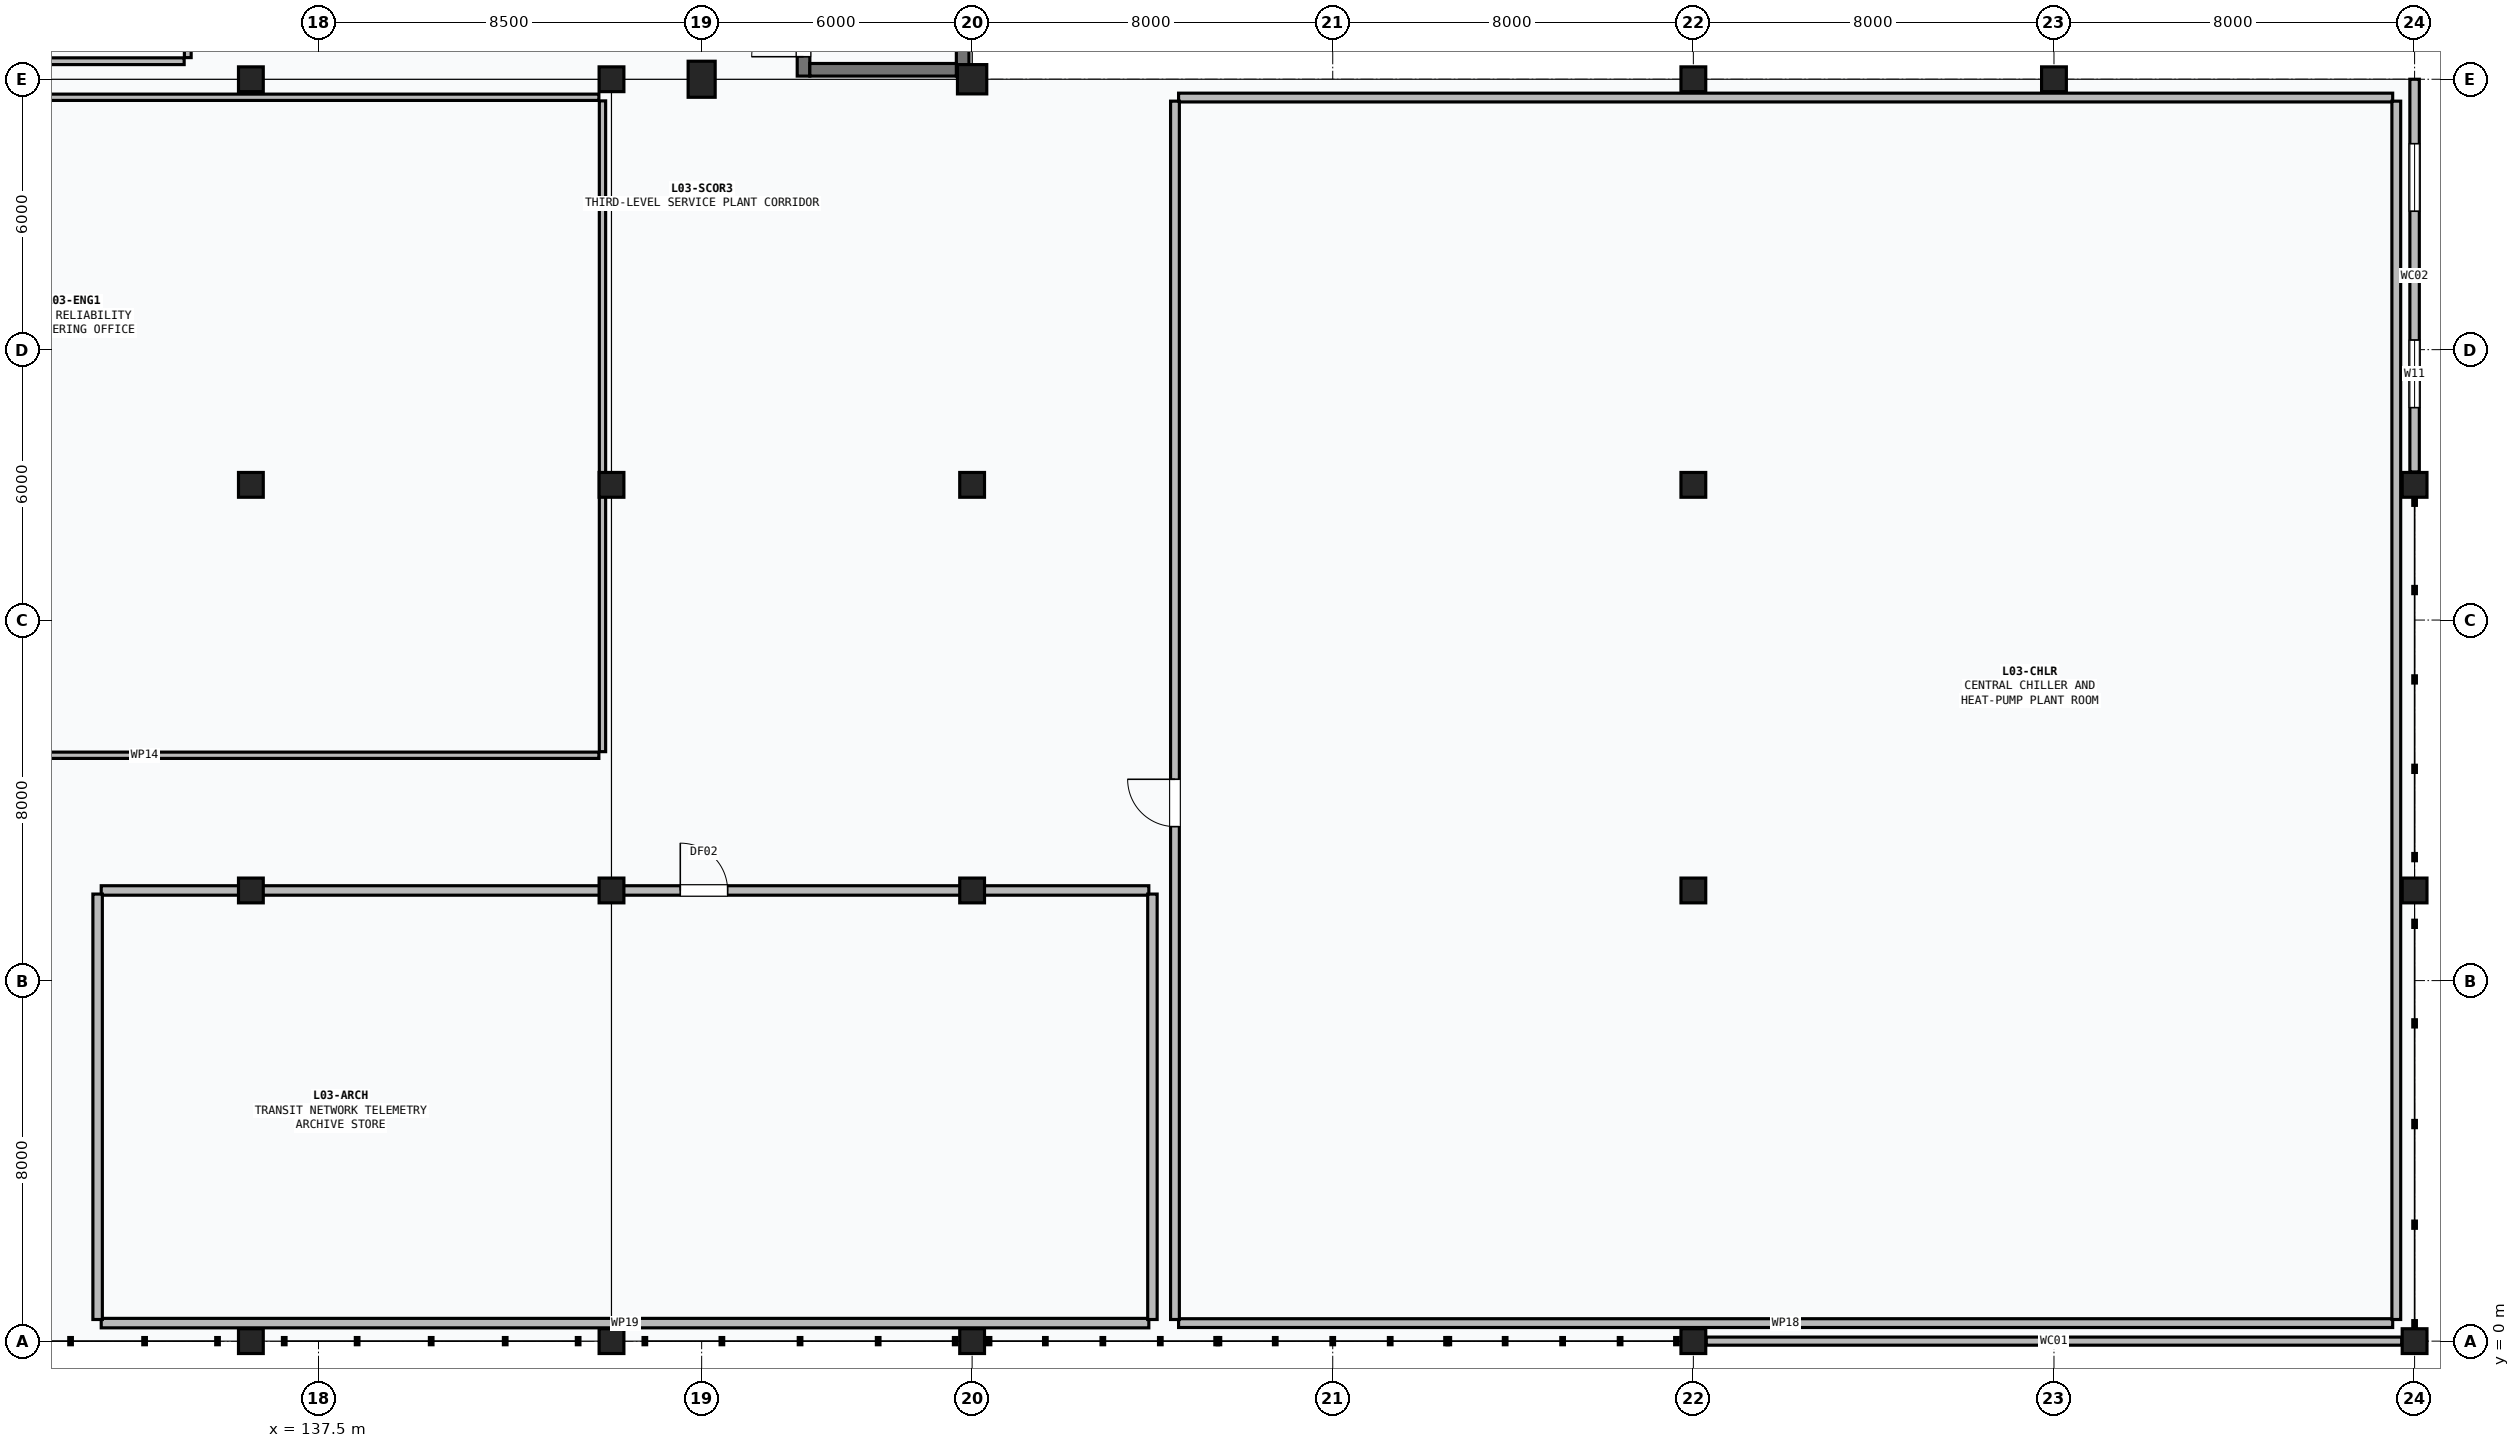
"""IFC4 building model, lengths in metres.
Left out: names, types, materials, properties, quantities, classifications, styles, units other than length and angle.
Written with IfcOpenShell. Run it as: python <this file> out.ifc"""

import sys

from ifc_helpers import new_model, si_unit, direction, frame, frame_2d, origin, origin_2d, place, context, subcontext, project, spatial, rectangle, i_section, extrude, element, fill, save


model = new_model("IFC4")
c1 = context("Model", 3, precision=1e-05, world=origin(), true_north=direction((0.0, 1.0)))
c2 = subcontext(c1, "Body", "Model", "MODEL_VIEW")
j1 = project(units=[si_unit("LENGTHUNIT", "METRE"), si_unit("PLANEANGLEUNIT", "RADIAN")], contexts=[c1])
p1 = place(None, origin())
s1 = spatial("IfcSite", under=j1, at=p1, CompositionType="ELEMENT")
p2 = place(p1, origin())
s2 = spatial("IfcBuilding", under=s1, at=p2, CompositionType="ELEMENT")
p3 = place(p2, frame((0.0, 0.0, 12.0)))
s3 = spatial("IfcBuildingStorey", under=s2, at=p3, CompositionType="ELEMENT", Elevation=12.0)
p4 = place(p3, frame((146.0, 28.0, 0.0), z_axis=(0.0, 0.0, 1.0), x_axis=(1.0, 0.0, 0.0)))
e1 = element("IfcColumn", 1, at=p4, inside=s3, PredefinedType="COLUMN", context=c2, shape_type="SweptSolid", body=[
    extrude(rectangle(XDim=0.6, YDim=0.8, at=origin_2d()), origin(), (0.0, 0.0, 1.0), 3.6),
])
p5 = place(p3, frame((152.0, 28.0, 0.0), z_axis=(0.0, 0.0, 1.0), x_axis=(1.0, 0.0, 0.0)))
e2 = element("IfcColumn", 2, at=p5, inside=s3, PredefinedType="COLUMN", context=c2, shape_type="SweptSolid", body=[
    extrude(rectangle(XDim=0.65, YDim=0.65, at=origin_2d()), origin(), (0.0, 0.0, 1.0), 3.6),
])
for number, where, z_axis, x_axis in (
    (3, (136.0, 0.0, 0.0), (0.0, 0.0, 1.0), (1.0, 0.0, 0.0)),
    (4, (136.0, 10.0, 0.0), (0.0, 0.0, 1.0), (1.0, 0.0, 0.0)),
    (5, (136.0, 19.0, 0.0), (0.0, 0.0, 1.0), (1.0, 0.0, 0.0)),
    (6, (136.0, 28.0, 0.0), (0.0, 0.0, 1.0), (1.0, 0.0, 0.0)),
    (7, (144.0, 0.0, 0.0), (0.0, 0.0, 1.0), (1.0, 0.0, 0.0)),
    (8, (144.0, 10.0, 0.0), (0.0, 0.0, 1.0), (1.0, 0.0, 0.0)),
    (9, (144.0, 19.0, 0.0), (0.0, 0.0, 1.0), (1.0, 0.0, 0.0)),
    (10, (144.0, 28.0, 0.0), (0.0, 0.0, 1.0), (1.0, 0.0, 0.0)),
    (11, (152.0, 0.0, 0.0), (0.0, 0.0, 1.0), (1.0, 0.0, 0.0)),
    (12, (152.0, 10.0, 0.0), (0.0, 0.0, 1.0), (1.0, 0.0, 0.0)),
    (13, (152.0, 19.0, 0.0), (0.0, 0.0, 1.0), (1.0, 0.0, 0.0)),
    (14, (168.0, 0.0, 0.0), (0.0, 0.0, 1.0), (1.0, 0.0, 0.0)),
    (15, (168.0, 10.0, 0.0), (0.0, 0.0, 1.0), (1.0, 0.0, 0.0)),
    (16, (168.0, 19.0, 0.0), (0.0, 0.0, 1.0), (1.0, 0.0, 0.0)),
    (17, (168.0, 28.0, 0.0), (0.0, 0.0, 1.0), (1.0, 0.0, 0.0)),
    (18, (176.0, 28.0, 0.0), (0.0, 0.0, 1.0), (1.0, 0.0, 0.0)),
    (19, (184.0, 0.0, 0.0), (0.0, 0.0, 1.0), (1.0, 0.0, 0.0)),
    (20, (184.0, 10.0, 0.0), (0.0, 0.0, 1.0), (1.0, 0.0, 0.0)),
    (21, (184.0, 19.0, 0.0), (0.0, 0.0, 1.0), (1.0, 0.0, 0.0)),
):
    element("IfcColumn", number, at=place(p3, frame(where, z_axis=z_axis, x_axis=x_axis)), inside=s3, PredefinedType="COLUMN", context=c2, shape_type="SweptSolid", body=[
        extrude(rectangle(XDim=0.55, YDim=0.55, at=origin_2d()), origin(), (0.0, 0.0, 1.0), 3.6),
    ])
p6 = place(p2, frame((0.0, 0.0, 8.4)))
s4 = spatial("IfcBuildingStorey", under=s2, at=p6, CompositionType="ELEMENT", Elevation=8.4)
p7 = place(p6, frame((184.0, 28.0, 0.0), z_axis=(0.0, 0.0, 1.0), x_axis=(1.0, 0.0, 0.0)))
e22 = element("IfcColumn", 22, at=p7, inside=s4, PredefinedType="COLUMN", context=c2, shape_type="SweptSolid", body=[
    extrude(i_section(OverallWidth=0.309, OverallDepth=0.321, WebThickness=0.014, FlangeThickness=0.022, FilletRadius=0.015, at=origin_2d()), origin(), (0.0, 0.0, 1.0), 8.15),
])
p8 = place(p3, frame((168.285, 0.0, 0.0), z_axis=(0.0, 0.0, 1.0), x_axis=(1.0, 0.0, 0.0)))
e23 = element("IfcWall", 23, at=p8, inside=s3, PredefinedType="USERDEFINED", context=c2, shape_type="SweptSolid", body=[
    extrude(rectangle(XDim=15.43, YDim=0.18, at=frame_2d((7.715, 0.0))), origin(), (0.0, 0.0, 1.0), 2.195),
])
p9 = place(p3, frame((184.0, 19.285, 0.0), z_axis=(0.0, 0.0, 1.0), x_axis=(0.0, 1.0, 0.0)))
e24 = element("IfcWall", 24, at=p9, inside=s3, PredefinedType="USERDEFINED", context=c2, shape_type="SweptSolid", body=[
    extrude(rectangle(XDim=8.715, YDim=0.21, at=frame_2d((4.357, 0.0))), origin(), (0.0, 0.0, 1.0), 3.335),
])
p10 = place(p9, frame((1.429, 0.0, 0.95)))
e25 = element("IfcOpeningElement", 25, at=p10, cuts=e24, PredefinedType="OPENING", context=c2, shape_type="SweptSolid", body=[
    extrude(rectangle(XDim=1.5, YDim=1.8, at=frame_2d((0.75, 0.9))), frame((0.0, 0.115, 0.0), z_axis=(0.0, -1.0, 0.0), x_axis=(1.0, 0.0, 0.0)), (0.0, 0.0, 1.0), 0.23),
])
p11 = place(p9, frame((5.786, 0.0, 0.95)))
e26 = element("IfcOpeningElement", 26, at=p11, cuts=e24, PredefinedType="OPENING", context=c2, shape_type="SweptSolid", body=[
    extrude(rectangle(XDim=1.5, YDim=1.8, at=frame_2d((0.75, 0.9))), frame((0.0, 0.115, 0.0), z_axis=(0.0, -1.0, 0.0), x_axis=(1.0, 0.0, 0.0)), (0.0, 0.0, 1.0), 0.23),
])
p12 = place(p3, frame((148.26, 28.07, 0.0), z_axis=(0.0, 0.0, 1.0), x_axis=(0.0, 1.0, 0.0)))
e27 = element("IfcWall", 27, at=p12, inside=s3, PredefinedType="SHEAR", context=c2, shape_type="SweptSolid", body=[
    extrude(rectangle(XDim=9.86, YDim=0.28, at=frame_2d((4.93, 0.0))), origin(), (0.0, 0.0, 1.0), 3.6),
])
p13 = place(p12, frame((0.43, 0.0, 0.0)))
e28 = element("IfcOpeningElement", 28, at=p13, cuts=e27, PredefinedType="OPENING", context=c2, shape_type="SweptSolid", body=[
    extrude(rectangle(XDim=1.15, YDim=2.15, at=frame_2d((0.575, 1.075))), frame((0.0, 0.15, 0.0), z_axis=(0.0, -1.0, 0.0), x_axis=(1.0, 0.0, 0.0)), (0.0, 0.0, 1.0), 0.3),
])
p14 = place(p3, frame((151.79, 37.93, 0.0), z_axis=(0.0, 0.0, 1.0), x_axis=(0.0, -1.0, 0.0)))
e29 = element("IfcWall", 29, at=p14, inside=s3, PredefinedType="SHEAR", context=c2, shape_type="SweptSolid", body=[
    extrude(rectangle(XDim=9.86, YDim=0.28, at=frame_2d((4.93, 0.0))), origin(), (0.0, 0.0, 1.0), 3.6),
])
p15 = place(p3, frame((151.65, 28.21, 0.0), z_axis=(0.0, 0.0, 1.0), x_axis=(-1.0, 0.0, 0.0)))
e30 = element("IfcWall", 30, at=p15, inside=s3, PredefinedType="SHEAR", context=c2, shape_type="SweptSolid", body=[
    extrude(rectangle(XDim=3.25, YDim=0.28, at=frame_2d((1.625, 0.0))), origin(), (0.0, 0.0, 1.0), 3.6),
])
p16 = place(p3, frame((112.48, 28.4, 0.0), z_axis=(0.0, 0.0, 1.0), x_axis=(1.0, 0.0, 0.0)))
e31 = element("IfcWall", 31, at=p16, inside=s3, PredefinedType="PARTITIONING", context=c2, shape_type="SweptSolid", body=[
    extrude(rectangle(XDim=22.04, YDim=0.15, at=frame_2d((11.02, 0.0))), origin(), (0.0, 0.0, 1.0), 2.495),
])
p17 = place(p3, frame((134.6, 28.48, 0.0), z_axis=(0.0, 0.0, 1.0), x_axis=(0.0, 1.0, 0.0)))
e32 = element("IfcWall", 32, at=p17, inside=s3, PredefinedType="PARTITIONING", context=c2, shape_type="SweptSolid", body=[
    extrude(rectangle(XDim=9.44, YDim=0.15, at=frame_2d((4.72, 0.0))), origin(), (0.0, 0.0, 1.0), 3.345),
])
p18 = place(p17, frame((3.92, 0.0, 0.0)))
e33 = element("IfcOpeningElement", 33, at=p18, cuts=e32, PredefinedType="OPENING", context=c2, shape_type="SweptSolid", body=[
    extrude(rectangle(XDim=1.6, YDim=2.15, at=frame_2d((0.8, 1.075))), frame((0.0, 0.085, 0.0), z_axis=(0.0, -1.0, 0.0), x_axis=(1.0, 0.0, 0.0)), (0.0, 0.0, 1.0), 0.17),
])
p19 = place(p3, frame((112.48, 13.0, 0.0), z_axis=(0.0, 0.0, 1.0), x_axis=(1.0, 0.0, 0.0)))
e34 = element("IfcWall", 34, at=p19, inside=s3, PredefinedType="PARTITIONING", context=c2, shape_type="SweptSolid", body=[
    extrude(rectangle(XDim=31.24, YDim=0.14, at=frame_2d((15.62, 0.0))), origin(), (0.0, 0.0, 1.0), 2.645),
])
p20 = place(p19, frame((15.17, 0.0, 0.0)))
e35 = element("IfcOpeningElement", 35, at=p20, cuts=e34, PredefinedType="OPENING", context=c2, shape_type="SweptSolid", body=[
    extrude(rectangle(XDim=0.9, YDim=2.1, at=frame_2d((0.45, 1.05))), frame((0.0, 0.08, 0.0), z_axis=(0.0, -1.0, 0.0), x_axis=(1.0, 0.0, 0.0)), (0.0, 0.0, 1.0), 0.16),
])
p21 = place(p3, frame((112.48, 27.6, 0.0), z_axis=(0.0, 0.0, 1.0), x_axis=(1.0, 0.0, 0.0)))
e36 = element("IfcWall", 36, at=p21, inside=s3, PredefinedType="PARTITIONING", context=c2, shape_type="SweptSolid", body=[
    extrude(rectangle(XDim=31.24, YDim=0.14, at=frame_2d((15.62, 0.0))), origin(), (0.0, 0.0, 1.0), 2.245),
])
p22 = place(p3, frame((143.8, 13.08, 0.0), z_axis=(0.0, 0.0, 1.0), x_axis=(0.0, 1.0, 0.0)))
e37 = element("IfcWall", 37, at=p22, inside=s3, PredefinedType="PARTITIONING", context=c2, shape_type="SweptSolid", body=[
    extrude(rectangle(XDim=14.44, YDim=0.14, at=frame_2d((7.22, 0.0))), origin(), (0.0, 0.0, 1.0), 2.245),
])
p23 = place(p3, frame((132.68, 0.4, 0.0), z_axis=(0.0, 0.0, 1.0), x_axis=(1.0, 0.0, 0.0)))
e38 = element("IfcWall", 38, at=p23, inside=s3, PredefinedType="PARTITIONING", context=c2, shape_type="SweptSolid", body=[
    extrude(rectangle(XDim=23.24, YDim=0.21, at=frame_2d((11.62, 0.0))), origin(), (0.0, 0.0, 1.0), 2.645),
])
p24 = place(p3, frame((132.68, 10.0, 0.0), z_axis=(0.0, 0.0, 1.0), x_axis=(1.0, 0.0, 0.0)))
e39 = element("IfcWall", 39, at=p24, inside=s3, PredefinedType="PARTITIONING", context=c2, shape_type="SweptSolid", body=[
    extrude(rectangle(XDim=23.24, YDim=0.21, at=frame_2d((11.62, 0.0))), origin(), (0.0, 0.0, 1.0), 2.245),
])
p25 = place(p24, frame((12.846, 0.0, 0.0)))
e40 = element("IfcOpeningElement", 40, at=p25, cuts=e39, PredefinedType="OPENING", context=c2, shape_type="SweptSolid", body=[
    extrude(rectangle(XDim=1.05, YDim=2.15, at=frame_2d((0.525, 1.075))), frame((0.0, 0.115, 0.0), z_axis=(0.0, -1.0, 0.0), x_axis=(1.0, 0.0, 0.0)), (0.0, 0.0, 1.0), 0.23),
])
p26 = place(p3, frame((132.6, 0.48, 0.0), z_axis=(0.0, 0.0, 1.0), x_axis=(0.0, 1.0, 0.0)))
e41 = element("IfcWall", 41, at=p26, inside=s3, PredefinedType="PARTITIONING", context=c2, shape_type="SweptSolid", body=[
    extrude(rectangle(XDim=9.44, YDim=0.21, at=frame_2d((4.72, 0.0))), origin(), (0.0, 0.0, 1.0), 2.745),
])
p27 = place(p3, frame((156.0, 0.48, 0.0), z_axis=(0.0, 0.0, 1.0), x_axis=(0.0, 1.0, 0.0)))
e42 = element("IfcWall", 42, at=p27, inside=s3, PredefinedType="PARTITIONING", context=c2, shape_type="SweptSolid", body=[
    extrude(rectangle(XDim=9.44, YDim=0.21, at=frame_2d((4.72, 0.0))), origin(), (0.0, 0.0, 1.0), 2.495),
])
p28 = place(p3, frame((156.58, 0.4, 0.0), z_axis=(0.0, 0.0, 1.0), x_axis=(1.0, 0.0, 0.0)))
e43 = element("IfcWall", 43, at=p28, inside=s3, PredefinedType="PARTITIONING", context=c2, shape_type="SweptSolid", body=[
    extrude(rectangle(XDim=26.934, YDim=0.195, at=frame_2d((13.467, 0.0))), origin(), (0.0, 0.0, 1.0), 2.645),
])
p29 = place(p3, frame((156.58, 27.594, 0.0), z_axis=(0.0, 0.0, 1.0), x_axis=(1.0, 0.0, 0.0)))
e44 = element("IfcWall", 44, at=p29, inside=s3, PredefinedType="PARTITIONING", context=c2, shape_type="SweptSolid", body=[
    extrude(rectangle(XDim=26.934, YDim=0.195, at=frame_2d((13.467, 0.0))), origin(), (0.0, 0.0, 1.0), 2.495),
])
p30 = place(p3, frame((156.5, 0.48, 0.0), z_axis=(0.0, 0.0, 1.0), x_axis=(0.0, 1.0, 0.0)))
e45 = element("IfcWall", 45, at=p30, inside=s3, PredefinedType="PARTITIONING", context=c2, shape_type="SweptSolid", body=[
    extrude(rectangle(XDim=27.034, YDim=0.195, at=frame_2d((13.517, 0.0))), origin(), (0.0, 0.0, 1.0), 2.495),
])
p31 = place(p30, frame((10.937, 0.0, 0.0)))
e46 = element("IfcOpeningElement", 46, at=p31, cuts=e45, PredefinedType="OPENING", context=c2, shape_type="SweptSolid", body=[
    extrude(rectangle(XDim=1.05, YDim=2.15, at=frame_2d((0.525, 1.075))), frame((0.0, 0.107, 0.0), z_axis=(0.0, -1.0, 0.0), x_axis=(1.0, 0.0, 0.0)), (0.0, 0.0, 1.0), 0.215),
])
p32 = place(p3, frame((183.594, 0.48, 0.0), z_axis=(0.0, 0.0, 1.0), x_axis=(0.0, 1.0, 0.0)))
e47 = element("IfcWall", 47, at=p32, inside=s3, PredefinedType="PARTITIONING", context=c2, shape_type="SweptSolid", body=[
    extrude(rectangle(XDim=27.034, YDim=0.195, at=frame_2d((13.517, 0.0))), origin(), (0.0, 0.0, 1.0), 2.495),
])
p33 = place(p10, origin())
e48 = element("IfcWindow", 48, at=p33, inside=s3, PartitioningType="SINGLE_PANEL", PredefinedType="WINDOW", context=c2, shape_type="SweptSolid", body=[
    extrude(rectangle(XDim=1.5, YDim=1.8, at=frame_2d((0.75, 0.9))), frame((0.0, 0.03, 0.0), z_axis=(0.0, -1.0, 0.0), x_axis=(1.0, 0.0, 0.0)), (0.0, 0.0, 1.0), 0.06),
])
fill(e25, e48)
p34 = place(p11, origin())
e49 = element("IfcWindow", 49, at=p34, inside=s3, PartitioningType="SINGLE_PANEL", PredefinedType="WINDOW", context=c2, shape_type="SweptSolid", body=[
    extrude(rectangle(XDim=1.5, YDim=1.8, at=frame_2d((0.75, 0.9))), frame((0.0, 0.03, 0.0), z_axis=(0.0, -1.0, 0.0), x_axis=(1.0, 0.0, 0.0)), (0.0, 0.0, 1.0), 0.06),
])
fill(e26, e49)
p35 = place(p13, origin())
e50 = element("IfcDoor", 50, at=p35, inside=s3, OperationType="SINGLE_SWING_LEFT", PredefinedType="DOOR", context=c2, shape_type="SweptSolid", body=[
    extrude(rectangle(XDim=1.15, YDim=2.15, at=frame_2d((0.575, 1.075))), frame((0.0, 0.025, 0.0), z_axis=(0.0, -1.0, 0.0), x_axis=(1.0, 0.0, 0.0)), (0.0, 0.0, 1.0), 0.05),
])
fill(e28, e50)
p36 = place(p25, origin())
e51 = element("IfcDoor", 51, at=p36, inside=s3, OperationType="SINGLE_SWING_LEFT", PredefinedType="DOOR", context=c2, shape_type="SweptSolid", body=[
    extrude(rectangle(XDim=1.05, YDim=2.15, at=frame_2d((0.525, 1.075))), frame((0.0, 0.025, 0.0), z_axis=(0.0, -1.0, 0.0), x_axis=(1.0, 0.0, 0.0)), (0.0, 0.0, 1.0), 0.05),
])
fill(e40, e51)
p37 = place(p31, origin())
e52 = element("IfcDoor", 52, at=p37, inside=s3, OperationType="SINGLE_SWING_RIGHT", PredefinedType="DOOR", context=c2, shape_type="SweptSolid", body=[
    extrude(rectangle(XDim=1.05, YDim=2.15, at=frame_2d((0.525, 1.075))), frame((0.0, 0.025, 0.0), z_axis=(0.0, -1.0, 0.0), x_axis=(1.0, 0.0, 0.0)), (0.0, 0.0, 1.0), 0.05),
])
fill(e46, e52)
save(model, sys.argv[1])
